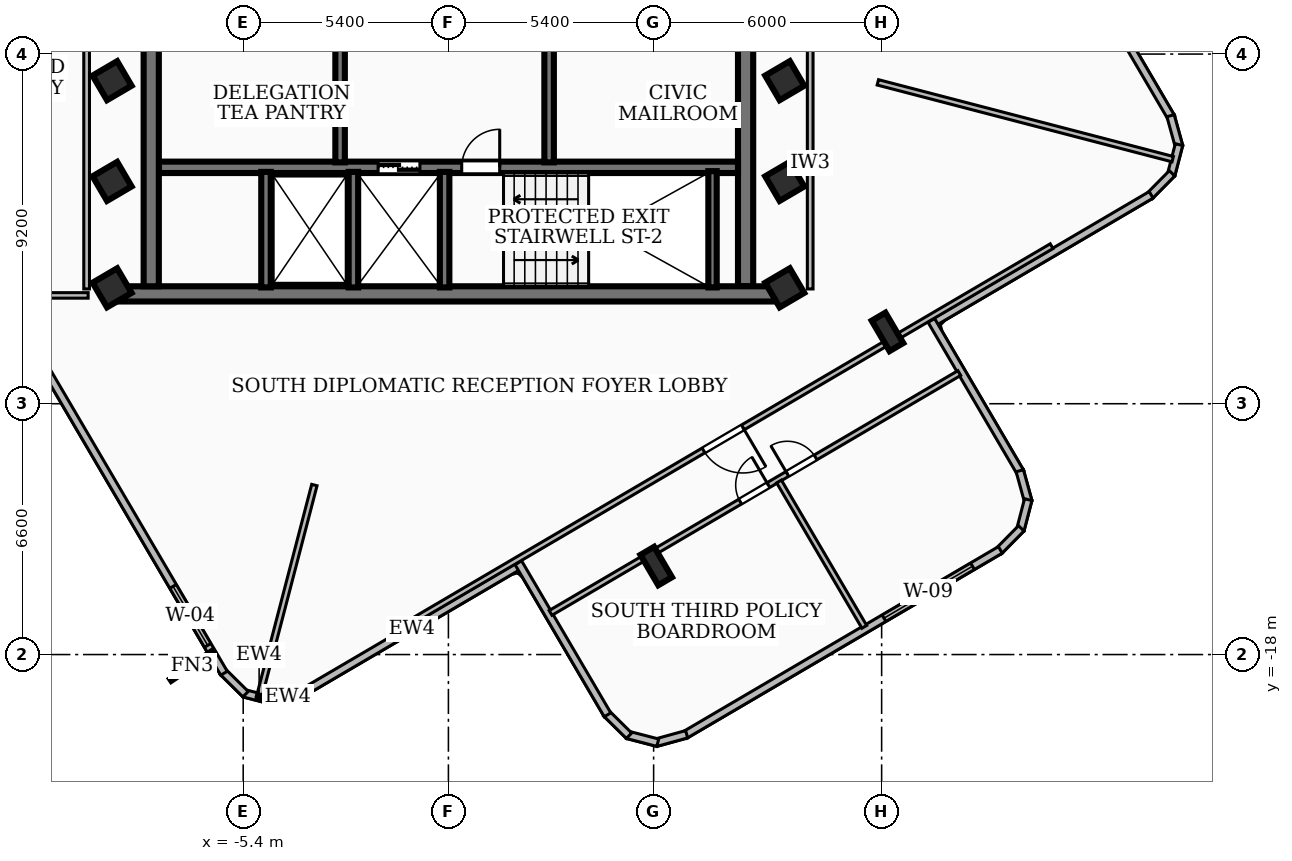
"""IFC4 building model, lengths in metres.
Left out: names, types, materials, properties, quantities, classifications, styles, units other than length and angle.
Written with IfcOpenShell. Run it as: python <this file> out.ifc"""

import sys

from ifc_helpers import new_model, si_unit, direction, frame, frame_2d, origin, origin_2d, place, context, subcontext, project, spatial, rectangle, i_section, extrude, element, fill, save


model = new_model("IFC4")
c1 = context("Model", 3, precision=1e-05, world=origin(), true_north=direction((0.0, 1.0)))
c2 = subcontext(c1, "Body", "Model", "MODEL_VIEW")
j1 = project(units=[si_unit("LENGTHUNIT", "METRE"), si_unit("PLANEANGLEUNIT", "RADIAN")], contexts=[c1])
p1 = place(None, origin())
s1 = spatial("IfcSite", under=j1, at=p1, CompositionType="ELEMENT")
p2 = place(p1, origin())
s2 = spatial("IfcBuilding", under=s1, at=p2, CompositionType="ELEMENT")
p3 = place(p2, frame((0.0, 0.0, 205.2)))
s3 = spatial("IfcBuildingStorey", under=s2, at=p3, CompositionType="ELEMENT", Elevation=205.2)
p4 = place(p3, frame((8.78, -8.51, 0.0), z_axis=(0.0, 0.0, 1.0), x_axis=(-1.0, 0.0, 0.0)))
e1 = element("IfcWall", 1, at=p4, inside=s3, PredefinedType="SHEAR", context=c2, shape_type="SweptSolid", body=[
    extrude(rectangle(XDim=17.56, YDim=0.4, at=frame_2d((8.78, 0.0))), origin(), (0.0, 0.0, 1.0), 3.16),
])
for number, where, z_axis, x_axis in (
    (2, (-7.82, -8.31, 0.0), (0.0, 0.0, 1.0), (0.0, 1.0, 0.0)),
    (3, (7.82, -1.95, 0.0), (0.0, 0.0, 1.0), (0.0, -1.0, 0.0)),
):
    element("IfcWall", number, at=place(p3, frame(where, z_axis=z_axis, x_axis=x_axis)), inside=s3, PredefinedType="SHEAR", context=c2, shape_type="SweptSolid", body=[
        extrude(rectangle(XDim=6.36, YDim=0.4, at=frame_2d((3.18, 0.0))), origin(), (0.0, 0.0, 1.0), 3.16),
    ])
p5 = place(p3, frame((-7.62, -5.18, 0.0), z_axis=(0.0, 0.0, 1.0), x_axis=(1.0, 0.0, 0.0)))
e4 = element("IfcWall", 4, at=p5, inside=s3, PredefinedType="SOLIDWALL", context=c2, shape_type="SweptSolid", body=[
    extrude(rectangle(XDim=15.24, YDim=0.3, at=frame_2d((7.62, 0.0))), origin(), (0.0, 0.0, 1.0), 3.16),
])
p6 = place(p5, frame((5.77, 0.0, 0.0)))
e5 = element("IfcOpeningElement", 5, at=p6, cuts=e4, PredefinedType="OPENING", context=c2, shape_type="SweptSolid", body=[
    extrude(rectangle(XDim=1.1, YDim=2.15, at=frame_2d((0.55, 1.075))), frame((0.0, 0.16, 0.0), z_axis=(0.0, -1.0, 0.0), x_axis=(1.0, 0.0, 0.0)), (0.0, 0.0, 1.0), 0.32),
])
p7 = place(p5, frame((7.97, 0.0, 0.0)))
e6 = element("IfcOpeningElement", 6, at=p7, cuts=e4, PredefinedType="OPENING", context=c2, shape_type="SweptSolid", body=[
    extrude(rectangle(XDim=1.0, YDim=2.1, at=frame_2d((0.5, 1.05))), frame((0.0, 0.16, 0.0), z_axis=(0.0, -1.0, 0.0), x_axis=(1.0, 0.0, 0.0)), (0.0, 0.0, 1.0), 0.32),
])
p8 = place(p3, frame((6.95, -8.34, 0.0), z_axis=(0.0, 0.0, 1.0), x_axis=(0.0, 1.0, 0.0)))
e7 = element("IfcWall", 7, at=p8, inside=s3, PredefinedType="SOLIDWALL", context=c2, shape_type="SweptSolid", body=[
    extrude(rectangle(XDim=3.06, YDim=0.22, at=frame_2d((1.53, 0.0))), origin(), (0.0, 0.0, 1.0), 3.16),
])
for number, where, z_axis, x_axis in (
    (8, (-0.1, -8.34, 0.0), (0.0, 0.0, 1.0), (0.0, 1.0, 0.0)),
    (9, (-2.5, -8.34, 0.0), (0.0, 0.0, 1.0), (0.0, 1.0, 0.0)),
    (10, (-4.8, -8.34, 0.0), (0.0, 0.0, 1.0), (0.0, 1.0, 0.0)),
):
    element("IfcWall", number, at=place(p3, frame(where, z_axis=z_axis, x_axis=x_axis)), inside=s3, PredefinedType="SOLIDWALL", context=c2, shape_type="SweptSolid", body=[
        extrude(rectangle(XDim=3.04, YDim=0.25, at=frame_2d((1.52, 0.0))), origin(), (0.0, 0.0, 1.0), 3.16),
    ])
for number, where, z_axis, x_axis in (
    (11, (-2.85, -5.05, 0.0), (0.0, 0.0, 1.0), (0.0, 1.0, 0.0)),
    (12, (2.65, -5.05, 0.0), (0.0, 0.0, 1.0), (0.0, 1.0, 0.0)),
):
    element("IfcWall", number, at=place(p3, frame(where, z_axis=z_axis, x_axis=x_axis)), inside=s3, PredefinedType="SOLIDWALL", context=c2, shape_type="SweptSolid", body=[
        extrude(rectangle(XDim=3.07, YDim=0.25, at=frame_2d((1.535, 0.0))), origin(), (0.0, 0.0, 1.0), 3.16),
    ])
for number, where, z_axis, x_axis in (
    (13, (-8.85, -5.55, 0.0), (0.0, 0.0, 1.0), (0.863, 0.506, 0.0)),
    (14, (-8.85, -2.9, 0.0), (0.0, 0.0, 1.0), (0.863, 0.506, 0.0)),
    (15, (8.85, -5.55, 0.0), (0.0, 0.0, 1.0), (0.863, 0.506, 0.0)),
    (16, (8.85, -2.9, 0.0), (0.0, 0.0, 1.0), (0.863, 0.506, 0.0)),
    (17, (8.85, -8.35, 0.0), (0.0, 0.0, 1.0), (0.863, 0.506, 0.0)),
    (18, (-8.85, -8.35, 0.0), (0.0, 0.0, 1.0), (0.863, 0.506, 0.0)),
):
    element("IfcColumn", number, at=place(p3, frame(where, z_axis=z_axis, x_axis=x_axis)), inside=s3, PredefinedType="COLUMN", context=c2, shape_type="SweptSolid", body=[
        extrude(rectangle(XDim=0.75, YDim=0.75, at=origin_2d()), origin(), (0.0, 0.0, 1.0), 3.42),
    ])
for number, where, z_axis, x_axis in (
    (19, (5.468, -15.671, 0.0), (0.0, 0.0, 1.0), (0.863, 0.506, 0.0)),
    (20, (11.554, -9.51, 0.0), (0.0, 0.0, 1.0), (0.863, 0.506, 0.0)),
):
    element("IfcColumn", number, at=place(p3, frame(where, z_axis=z_axis, x_axis=x_axis)), inside=s3, PredefinedType="COLUMN", context=c2, shape_type="SweptSolid", body=[
        extrude(i_section(OverallWidth=0.418, OverallDepth=0.927, WebThickness=0.019, FlangeThickness=0.032, at=origin_2d()), origin(), (0.0, 0.0, 1.0), 3.42),
    ])
p9 = place(p3, frame((1.948, -15.612, 0.0), z_axis=(0.0, 0.0, 1.0), x_axis=(-0.86259717351, -0.505891407569, 0.0)))
e21 = element("IfcWall", 21, at=p9, inside=s3, PredefinedType="SOLIDWALL", context=c2, shape_type="SweptSolid", body=[
    extrude(rectangle(XDim=6.742, YDim=0.2, at=frame_2d((3.371, 0.0))), origin(), (0.0, 0.0, 1.0), 3.16),
])
p10 = place(p3, frame((-3.822, -19.003, 0.0), z_axis=(0.0, 0.0, 1.0), x_axis=(-0.963905015631, -0.266246353668, 0.0)))
e22 = element("IfcWall", 22, at=p10, inside=s3, PredefinedType="SOLIDWALL", context=c2, shape_type="SweptSolid", body=[
    extrude(rectangle(XDim=0.838, YDim=0.2, at=frame_2d((0.419, 0.0))), origin(), (0.0, 0.0, 1.0), 3.16),
])
p11 = place(p3, frame((-4.582, -19.225, 0.0), z_axis=(0.0, 0.0, 1.0), x_axis=(-0.967943577658, 0.251167733737, 0.0)))
e23 = element("IfcWall", 23, at=p11, inside=s3, PredefinedType="SOLIDWALL", context=c2, shape_type="SweptSolid", body=[
    extrude(rectangle(XDim=0.824, YDim=0.2, at=frame_2d((0.412, 0.0))), origin(), (0.0, 0.0, 1.0), 3.16),
])
p12 = place(p3, frame((-5.338, -19.042, 0.0), z_axis=(0.0, 0.0, 1.0), x_axis=(-0.711310891957, 0.702877524881, 0.0)))
e24 = element("IfcWall", 24, at=p12, inside=s3, PredefinedType="SOLIDWALL", context=c2, shape_type="SweptSolid", body=[
    extrude(rectangle(XDim=0.84, YDim=0.2, at=frame_2d((0.42, 0.0))), origin(), (0.0, 0.0, 1.0), 3.16),
])
p13 = place(p3, frame((-5.904, -18.492, 0.0), z_axis=(0.0, 0.0, 1.0), x_axis=(-0.506046465446, 0.862506217258, 0.0)))
e25 = element("IfcWall", 25, at=p13, inside=s3, PredefinedType="SOLIDWALL", context=c2, shape_type="SweptSolid", body=[
    extrude(rectangle(XDim=25.924, YDim=0.2, at=frame_2d((12.962, 0.0))), origin(), (0.0, 0.0, 1.0), 3.16),
])
p14 = place(p13, frame((0.85, 0.0, 0.85)))
e26 = element("IfcOpeningElement", 26, at=p14, cuts=e25, PredefinedType="OPENING", context=c2, shape_type="SweptSolid", body=[
    extrude(rectangle(XDim=1.8, YDim=2.0, at=frame_2d((0.9, 1.0))), frame((0.0, 0.11, 0.0), z_axis=(0.0, -1.0, 0.0), x_axis=(1.0, 0.0, 0.0)), (0.0, 0.0, 1.0), 0.22),
])
p15 = place(p3, frame((15.611, 1.948, 0.0), z_axis=(0.0, 0.0, 1.0), x_axis=(0.505999167705, -0.862533965872, 0.0)))
e27 = element("IfcWall", 27, at=p15, inside=s3, PredefinedType="SOLIDWALL", context=c2, shape_type="SweptSolid", body=[
    extrude(rectangle(XDim=6.743, YDim=0.2, at=frame_2d((3.372, 0.0))), origin(), (0.0, 0.0, 1.0), 3.16),
])
p16 = place(p3, frame((19.003, -3.822, 0.0), z_axis=(0.0, 0.0, 1.0), x_axis=(0.266246353668, -0.963905015631, 0.0)))
e28 = element("IfcWall", 28, at=p16, inside=s3, PredefinedType="SOLIDWALL", context=c2, shape_type="SweptSolid", body=[
    extrude(rectangle(XDim=0.838, YDim=0.2, at=frame_2d((0.419, 0.0))), origin(), (0.0, 0.0, 1.0), 3.16),
])
p17 = place(p3, frame((19.225, -4.582, 0.0), z_axis=(0.0, 0.0, 1.0), x_axis=(-0.251167733737, -0.967943577658, 0.0)))
e29 = element("IfcWall", 29, at=p17, inside=s3, PredefinedType="SOLIDWALL", context=c2, shape_type="SweptSolid", body=[
    extrude(rectangle(XDim=0.824, YDim=0.2, at=frame_2d((0.412, 0.0))), origin(), (0.0, 0.0, 1.0), 3.16),
])
p18 = place(p3, frame((19.042, -5.338, 0.0), z_axis=(0.0, 0.0, 1.0), x_axis=(-0.702877524881, -0.711310891957, 0.0)))
e30 = element("IfcWall", 30, at=p18, inside=s3, PredefinedType="SOLIDWALL", context=c2, shape_type="SweptSolid", body=[
    extrude(rectangle(XDim=0.84, YDim=0.2, at=frame_2d((0.42, 0.0))), origin(), (0.0, 0.0, 1.0), 3.16),
])
p19 = place(p3, frame((18.492, -5.904, 0.0), z_axis=(0.0, 0.0, 1.0), x_axis=(-0.86245977502, -0.506125613333, 0.0)))
e31 = element("IfcWall", 31, at=p19, inside=s3, PredefinedType="SOLIDWALL", context=c2, shape_type="SweptSolid", body=[
    extrude(rectangle(XDim=6.741, YDim=0.2, at=frame_2d((3.371, 0.0))), origin(), (0.0, 0.0, 1.0), 3.16),
])
p20 = place(p3, frame((12.707, -9.207, 0.0), z_axis=(0.0, 0.0, 1.0), x_axis=(0.505936854923, -0.862570518178, 0.0)))
e32 = element("IfcWall", 32, at=p20, inside=s3, PredefinedType="SOLIDWALL", context=c2, shape_type="SweptSolid", body=[
    extrude(rectangle(XDim=4.641, YDim=0.2, at=frame_2d((2.32, 0.0))), origin(), (0.0, 0.0, 1.0), 3.16),
])
p21 = place(p3, frame((15.035, -13.164, 0.0), z_axis=(0.0, 0.0, 1.0), x_axis=(0.266246353668, -0.963905015631, 0.0)))
e33 = element("IfcWall", 33, at=p21, inside=s3, PredefinedType="SOLIDWALL", context=c2, shape_type="SweptSolid", body=[
    extrude(rectangle(XDim=0.838, YDim=0.2, at=frame_2d((0.419, 0.0))), origin(), (0.0, 0.0, 1.0), 3.16),
])
p22 = place(p3, frame((15.257, -13.924, 0.0), z_axis=(0.0, 0.0, 1.0), x_axis=(-0.251167733737, -0.967943577658, 0.0)))
e34 = element("IfcWall", 34, at=p22, inside=s3, PredefinedType="SOLIDWALL", context=c2, shape_type="SweptSolid", body=[
    extrude(rectangle(XDim=0.824, YDim=0.2, at=frame_2d((0.412, 0.0))), origin(), (0.0, 0.0, 1.0), 3.16),
])
p23 = place(p3, frame((15.074, -14.68, 0.0), z_axis=(0.0, 0.0, 1.0), x_axis=(-0.702877524881, -0.711310891957, 0.0)))
e35 = element("IfcWall", 35, at=p23, inside=s3, PredefinedType="SOLIDWALL", context=c2, shape_type="SweptSolid", body=[
    extrude(rectangle(XDim=0.84, YDim=0.2, at=frame_2d((0.42, 0.0))), origin(), (0.0, 0.0, 1.0), 3.16),
])
p24 = place(p3, frame((14.524, -15.246, 0.0), z_axis=(0.0, 0.0, 1.0), x_axis=(-0.862483422861, -0.506085314241, 0.0)))
e36 = element("IfcWall", 36, at=p24, inside=s3, PredefinedType="SOLIDWALL", context=c2, shape_type="SweptSolid", body=[
    extrude(rectangle(XDim=9.625, YDim=0.2, at=frame_2d((4.812, 0.0))), origin(), (0.0, 0.0, 1.0), 3.16),
])
p25 = place(p24, frame((0.85, 0.0, 0.85)))
e37 = element("IfcOpeningElement", 37, at=p25, cuts=e36, PredefinedType="OPENING", context=c2, shape_type="SweptSolid", body=[
    extrude(rectangle(XDim=2.7, YDim=1.65, at=frame_2d((1.35, 0.825))), frame((0.0, 0.11, 0.0), z_axis=(0.0, -1.0, 0.0), x_axis=(1.0, 0.0, 0.0)), (0.0, 0.0, 1.0), 0.22),
])
p26 = place(p3, frame((6.269, -20.097, 0.0), z_axis=(0.0, 0.0, 1.0), x_axis=(-0.963925656212, -0.266171616247, 0.0)))
e38 = element("IfcWall", 38, at=p26, inside=s3, PredefinedType="SOLIDWALL", context=c2, shape_type="SweptSolid", body=[
    extrude(rectangle(XDim=0.838, YDim=0.2, at=frame_2d((0.419, 0.0))), origin(), (0.0, 0.0, 1.0), 3.16),
])
p27 = place(p3, frame((5.509, -20.319, 0.0), z_axis=(0.0, 0.0, 1.0), x_axis=(-0.967962254737, 0.251095745493, 0.0)))
e39 = element("IfcWall", 39, at=p27, inside=s3, PredefinedType="SOLIDWALL", context=c2, shape_type="SweptSolid", body=[
    extrude(rectangle(XDim=0.824, YDim=0.2, at=frame_2d((0.412, 0.0))), origin(), (0.0, 0.0, 1.0), 3.16),
])
p28 = place(p3, frame((4.753, -20.136, 0.0), z_axis=(0.0, 0.0, 1.0), x_axis=(-0.711167178618, 0.70302293281, 0.0)))
e40 = element("IfcWall", 40, at=p28, inside=s3, PredefinedType="SOLIDWALL", context=c2, shape_type="SweptSolid", body=[
    extrude(rectangle(XDim=0.839, YDim=0.2, at=frame_2d((0.42, 0.0))), origin(), (0.0, 0.0, 1.0), 3.16),
])
p29 = place(p3, frame((4.187, -19.586, 0.0), z_axis=(0.0, 0.0, 1.0), x_axis=(-0.505936854923, 0.862570518178, 0.0)))
e41 = element("IfcWall", 41, at=p29, inside=s3, PredefinedType="SOLIDWALL", context=c2, shape_type="SweptSolid", body=[
    extrude(rectangle(XDim=4.641, YDim=0.2, at=frame_2d((2.32, 0.0))), origin(), (0.0, 0.0, 1.0), 3.16),
])
for number, where, z_axis, x_axis in (
    (42, (-9.52, -8.38, 0.0), (0.0, 0.0, 1.0), (0.0, 1.0, 0.0)),
    (43, (9.52, -8.38, 0.0), (0.0, 0.0, 1.0), (0.0, 1.0, 0.0)),
):
    element("IfcWall", number, at=place(p3, frame(where, z_axis=z_axis, x_axis=x_axis)), inside=s3, PredefinedType="PARTITIONING", context=c2, shape_type="SweptSolid", body=[
        extrude(rectangle(XDim=6.63, YDim=0.15, at=frame_2d((3.315, 0.0))), origin(), (0.0, 0.0, 1.0), 3.16),
    ])
p30 = place(p3, frame((-11.662, -8.55, 0.0), z_axis=(0.0, 0.0, 1.0), x_axis=(1.0, 0.0, 0.0)))
e44 = element("IfcWall", 44, at=p30, inside=s3, PredefinedType="PARTITIONING", context=c2, shape_type="SweptSolid", body=[
    extrude(rectangle(XDim=2.182, YDim=0.145, at=frame_2d((1.091, 0.0))), origin(), (0.0, 0.0, 1.0), 3.16),
])
p31 = place(p3, frame((-3.527, -13.54, 0.0), z_axis=(0.0, 0.0, 1.0), x_axis=(-0.252132617321, -0.967692690519, 0.0)))
e45 = element("IfcWall", 45, at=p31, inside=s3, PredefinedType="PARTITIONING", context=c2, shape_type="SweptSolid", body=[
    extrude(rectangle(XDim=5.703, YDim=0.145, at=frame_2d((2.852, 0.0))), origin(), (0.0, 0.0, 1.0), 3.16),
])
p32 = place(p3, frame((11.3, -2.944, 0.0), z_axis=(0.0, 0.0, 1.0), x_axis=(0.967711624716, -0.252059936106, 0.0)))
e46 = element("IfcWall", 46, at=p32, inside=s3, PredefinedType="PARTITIONING", context=c2, shape_type="SweptSolid", body=[
    extrude(rectangle(XDim=8.018, YDim=0.145, at=frame_2d((4.009, 0.0))), origin(), (0.0, 0.0, 1.0), 3.16),
])
p33 = place(p3, frame((15.873, -7.255, 0.0), z_axis=(0.0, 0.0, 1.0), x_axis=(-0.862498672631, -0.506059324299, 0.0)))
e47 = element("IfcWall", 47, at=p33, inside=s3, PredefinedType="PARTITIONING", context=c2, shape_type="SweptSolid", body=[
    extrude(rectangle(XDim=20.039, YDim=0.145, at=frame_2d((10.02, 0.0))), origin(), (0.0, 0.0, 1.0), 2.53),
])
p34 = place(p33, frame((9.42, 0.0, 0.0)))
e48 = element("IfcOpeningElement", 48, at=p34, cuts=e47, PredefinedType="OPENING", context=c2, shape_type="SweptSolid", body=[
    extrude(rectangle(XDim=1.2, YDim=2.1, at=frame_2d((0.6, 1.05))), frame((0.0, 0.083, 0.0), z_axis=(0.0, -1.0, 0.0), x_axis=(1.0, 0.0, 0.0)), (0.0, 0.0, 1.0), 0.165),
])
p35 = place(p3, frame((8.7, -13.446, 0.0), z_axis=(0.0, 0.0, 1.0), x_axis=(0.506043007476, -0.862508246097, 0.0)))
e49 = element("IfcWall", 49, at=p35, inside=s3, PredefinedType="PARTITIONING", context=c2, shape_type="SweptSolid", body=[
    extrude(rectangle(XDim=4.435, YDim=0.145, at=frame_2d((2.217, 0.0))), origin(), (0.0, 0.0, 1.0), 3.16),
])
p36 = place(p3, frame((2.688, -16.904, 0.0), z_axis=(0.0, 0.0, 1.0), x_axis=(0.862497334811, 0.506061604396, 0.0)))
e50 = element("IfcWall", 50, at=p36, inside=s3, PredefinedType="PARTITIONING", context=c2, shape_type="SweptSolid", body=[
    extrude(rectangle(XDim=12.471, YDim=0.145, at=frame_2d((6.235, 0.0))), origin(), (0.0, 0.0, 1.0), 2.53),
])
p37 = place(p36, frame((5.785, 0.0, 0.0)))
e51 = element("IfcOpeningElement", 51, at=p37, cuts=e50, PredefinedType="OPENING", context=c2, shape_type="SweptSolid", body=[
    extrude(rectangle(XDim=0.86, YDim=2.04, at=frame_2d((0.43, 1.02))), frame((0.0, 0.083, 0.0), z_axis=(0.0, -1.0, 0.0), x_axis=(1.0, 0.0, 0.0)), (0.0, 0.0, 1.0), 0.165),
])
p38 = place(p36, frame((7.225, 0.0, 0.0)))
e52 = element("IfcOpeningElement", 52, at=p38, cuts=e50, PredefinedType="OPENING", context=c2, shape_type="SweptSolid", body=[
    extrude(rectangle(XDim=0.86, YDim=2.04, at=frame_2d((0.43, 1.02))), frame((0.0, 0.083, 0.0), z_axis=(0.0, -1.0, 0.0), x_axis=(1.0, 0.0, 0.0)), (0.0, 0.0, 1.0), 0.165),
])
p39 = place(p14, origin())
e53 = element("IfcWindow", 53, at=p39, inside=s3, PartitioningType="SINGLE_PANEL", PredefinedType="WINDOW", context=c2, shape_type="SweptSolid", body=[
    extrude(rectangle(XDim=1.8, YDim=2.0, at=frame_2d((0.9, 1.0))), frame((0.0, 0.03, 0.0), z_axis=(0.0, -1.0, 0.0), x_axis=(1.0, 0.0, 0.0)), (0.0, 0.0, 1.0), 0.06),
])
fill(e26, e53)
p40 = place(p25, origin())
e54 = element("IfcWindow", 54, at=p40, inside=s3, PartitioningType="SINGLE_PANEL", PredefinedType="WINDOW", context=c2, shape_type="SweptSolid", body=[
    extrude(rectangle(XDim=2.7, YDim=1.65, at=frame_2d((1.35, 0.825))), frame((0.0, 0.03, 0.0), z_axis=(0.0, -1.0, 0.0), x_axis=(1.0, 0.0, 0.0)), (0.0, 0.0, 1.0), 0.06),
])
fill(e37, e54)
p41 = place(p6, origin())
e55 = element("IfcDoor", 55, at=p41, inside=s3, OperationType="DOUBLE_DOOR_SLIDING", PredefinedType="DOOR", context=c2, shape_type="SweptSolid", body=[
    extrude(rectangle(XDim=1.1, YDim=2.15, at=frame_2d((0.55, 1.075))), frame((0.0, 0.025, 0.0), z_axis=(0.0, -1.0, 0.0), x_axis=(1.0, 0.0, 0.0)), (0.0, 0.0, 1.0), 0.05),
])
fill(e5, e55)
p42 = place(p7, origin())
e56 = element("IfcDoor", 56, at=p42, inside=s3, OperationType="SINGLE_SWING_RIGHT", PredefinedType="DOOR", context=c2, shape_type="SweptSolid", body=[
    extrude(rectangle(XDim=1.0, YDim=2.1, at=frame_2d((0.5, 1.05))), frame((0.0, 0.025, 0.0), z_axis=(0.0, -1.0, 0.0), x_axis=(1.0, 0.0, 0.0)), (0.0, 0.0, 1.0), 0.05),
])
fill(e6, e56)
p43 = place(p34, origin())
e57 = element("IfcDoor", 57, at=p43, inside=s3, OperationType="SINGLE_SWING_LEFT", PredefinedType="DOOR", context=c2, shape_type="SweptSolid", body=[
    extrude(rectangle(XDim=1.2, YDim=2.1, at=frame_2d((0.6, 1.05))), frame((0.0, 0.025, 0.0), z_axis=(0.0, -1.0, 0.0), x_axis=(1.0, 0.0, 0.0)), (0.0, 0.0, 1.0), 0.05),
])
fill(e48, e57)
p44 = place(p37, origin())
e58 = element("IfcDoor", 58, at=p44, inside=s3, OperationType="SINGLE_SWING_RIGHT", PredefinedType="DOOR", context=c2, shape_type="SweptSolid", body=[
    extrude(rectangle(XDim=0.86, YDim=2.04, at=frame_2d((0.43, 1.02))), frame((0.0, 0.025, 0.0), z_axis=(0.0, -1.0, 0.0), x_axis=(1.0, 0.0, 0.0)), (0.0, 0.0, 1.0), 0.05),
])
fill(e51, e58)
p45 = place(p38, origin())
e59 = element("IfcDoor", 59, at=p45, inside=s3, OperationType="SINGLE_SWING_LEFT", PredefinedType="DOOR", context=c2, shape_type="SweptSolid", body=[
    extrude(rectangle(XDim=0.86, YDim=2.04, at=frame_2d((0.43, 1.02))), frame((0.0, 0.025, 0.0), z_axis=(0.0, -1.0, 0.0), x_axis=(1.0, 0.0, 0.0)), (0.0, 0.0, 1.0), 0.05),
])
fill(e52, e59)
save(model, sys.argv[1])
